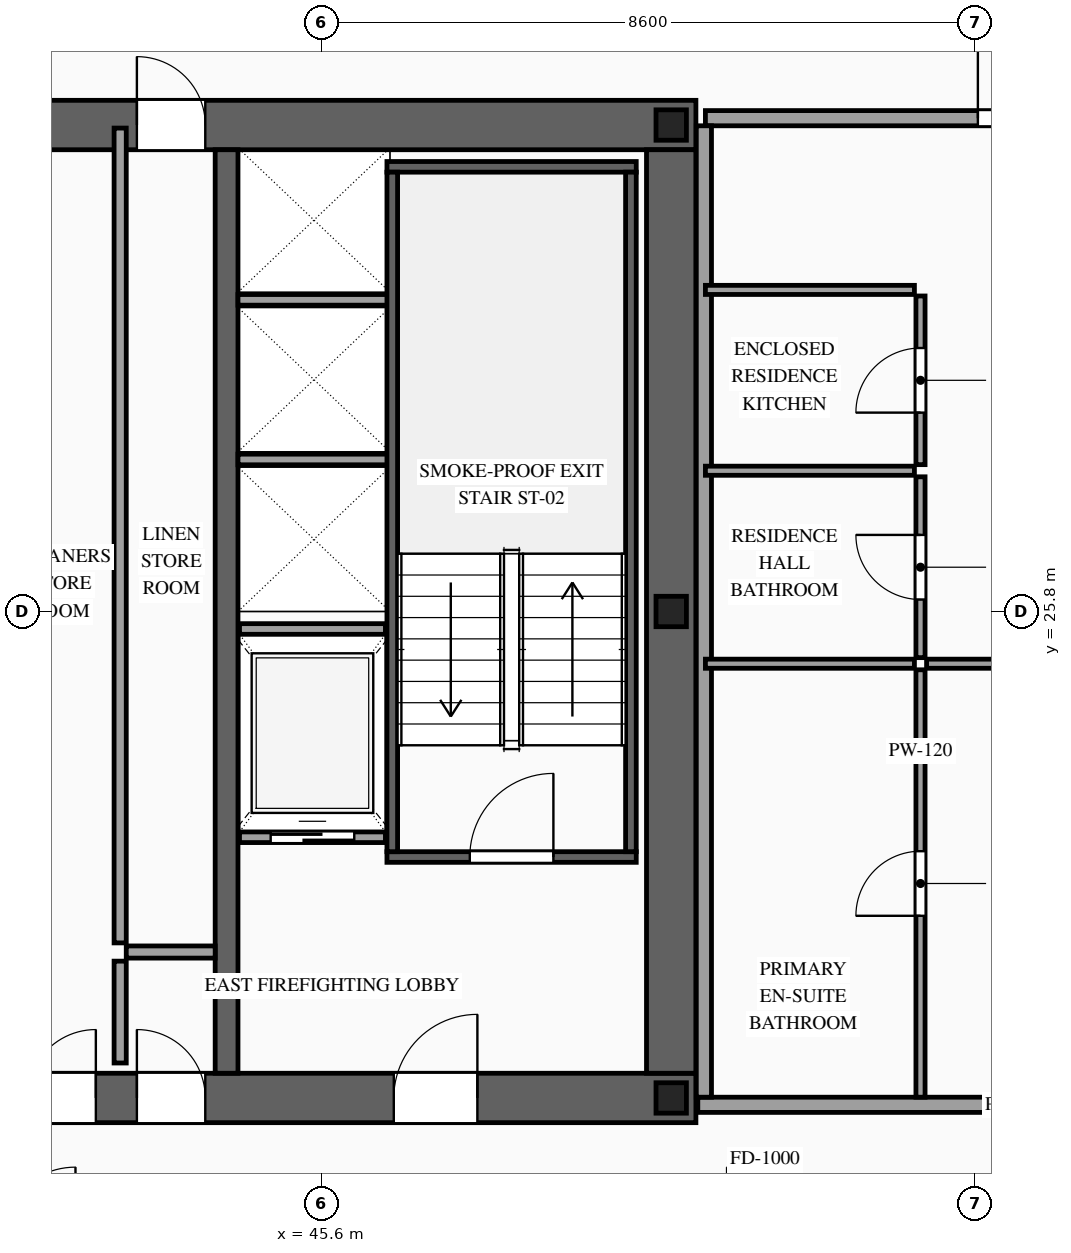
"""IFC4 building model, lengths in metres.
Left out: names, types, materials, properties, quantities, classifications, styles, units other than length and angle.
Written with IfcOpenShell. Run it as: python <this file> out.ifc"""

import sys

from ifc_helpers import new_model, si_unit, direction, frame, frame_2d, origin, origin_2d, place, context, subcontext, project, spatial, rectangle, i_section, extrude, source, transform, mapped, element, fill, save


model = new_model("IFC4")
c1 = context("Model", 3, precision=1e-05, world=origin(), true_north=direction((0.0, 1.0)))
c2 = subcontext(c1, "Body", "Model", "MODEL_VIEW")
j1 = project(units=[si_unit("LENGTHUNIT", "METRE"), si_unit("PLANEANGLEUNIT", "RADIAN")], contexts=[c1])
p1 = place(None, origin())
s1 = spatial("IfcSite", under=j1, at=p1, CompositionType="ELEMENT")
p2 = place(p1, origin())
s2 = spatial("IfcBuilding", under=s1, at=p2, CompositionType="ELEMENT")
p3 = place(p2, frame((0.0, 0.0, 188.0)))
s3 = spatial("IfcBuildingStorey", under=s2, at=p3, CompositionType="ELEMENT", Elevation=188.0)
p4 = place(p3, frame((23.475, 19.4, 0.0), z_axis=(0.0, 0.0, 1.0), x_axis=(1.0, 0.0, 0.0)))
e1 = element("IfcWall", 1, at=p4, inside=s3, PredefinedType="SHEAR", context=c2, shape_type="SweptSolid", body=[
    extrude(rectangle(XDim=27.05, YDim=0.65, at=frame_2d((13.525, 0.0))), origin(), (0.0, 0.0, 1.0), 3.5),
])
p5 = place(p4, frame((1.975, 0.0, 0.0)))
e2 = element("IfcOpeningElement", 2, at=p5, cuts=e1, PredefinedType="OPENING", context=c2, shape_type="SweptSolid", body=[
    extrude(rectangle(XDim=1.1, YDim=2.2, at=frame_2d((0.55, 1.1))), frame((0.0, 0.34, 0.0), z_axis=(0.0, -1.0, 0.0), x_axis=(1.0, 0.0, 0.0)), (0.0, 0.0, 1.0), 0.68),
])
p6 = place(p4, frame((9.875, 0.0, 0.0)))
e3 = element("IfcOpeningElement", 3, at=p6, cuts=e1, PredefinedType="OPENING", context=c2, shape_type="SweptSolid", body=[
    extrude(rectangle(XDim=1.1, YDim=2.2, at=frame_2d((0.55, 1.1))), frame((0.0, 0.34, 0.0), z_axis=(0.0, -1.0, 0.0), x_axis=(1.0, 0.0, 0.0)), (0.0, 0.0, 1.0), 0.68),
])
p7 = place(p4, frame((23.075, 0.0, 0.0)))
e4 = element("IfcOpeningElement", 4, at=p7, cuts=e1, PredefinedType="OPENING", context=c2, shape_type="SweptSolid", body=[
    extrude(rectangle(XDim=1.1, YDim=2.2, at=frame_2d((0.55, 1.1))), frame((0.0, 0.34, 0.0), z_axis=(0.0, -1.0, 0.0), x_axis=(1.0, 0.0, 0.0)), (0.0, 0.0, 1.0), 0.68),
])
p8 = place(p4, frame((19.695, 0.0, 0.0)))
e5 = element("IfcOpeningElement", 5, at=p8, cuts=e1, PredefinedType="OPENING", context=c2, shape_type="SweptSolid", body=[
    extrude(rectangle(XDim=0.9, YDim=2.15, at=frame_2d((0.45, 1.075))), frame((0.0, 0.34, 0.0), z_axis=(0.0, -1.0, 0.0), x_axis=(1.0, 0.0, 0.0)), (0.0, 0.0, 1.0), 0.68),
])
p9 = place(p4, frame((18.255, 0.0, 0.0)))
e6 = element("IfcOpeningElement", 6, at=p9, cuts=e1, PredefinedType="OPENING", context=c2, shape_type="SweptSolid", body=[
    extrude(rectangle(XDim=0.9, YDim=2.15, at=frame_2d((0.45, 1.075))), frame((0.0, 0.34, 0.0), z_axis=(0.0, -1.0, 0.0), x_axis=(1.0, 0.0, 0.0)), (0.0, 0.0, 1.0), 0.68),
])
p10 = place(p3, frame((23.475, 32.2, 0.0), z_axis=(0.0, 0.0, 1.0), x_axis=(1.0, 0.0, 0.0)))
e7 = element("IfcWall", 7, at=p10, inside=s3, PredefinedType="SHEAR", context=c2, shape_type="SweptSolid", body=[
    extrude(rectangle(XDim=27.05, YDim=0.65, at=frame_2d((13.525, 0.0))), origin(), (0.0, 0.0, 1.0), 3.5),
])
p11 = place(p10, frame((4.595, 0.0, 0.0)))
e8 = element("IfcOpeningElement", 8, at=p11, cuts=e7, PredefinedType="OPENING", context=c2, shape_type="SweptSolid", body=[
    extrude(rectangle(XDim=0.9, YDim=2.15, at=frame_2d((0.45, 1.075))), frame((0.0, 0.34, 0.0), z_axis=(0.0, -1.0, 0.0), x_axis=(1.0, 0.0, 0.0)), (0.0, 0.0, 1.0), 0.68),
])
p12 = place(p10, frame((9.875, 0.0, 0.0)))
e9 = element("IfcOpeningElement", 9, at=p12, cuts=e7, PredefinedType="OPENING", context=c2, shape_type="SweptSolid", body=[
    extrude(rectangle(XDim=1.1, YDim=2.2, at=frame_2d((0.55, 1.1))), frame((0.0, 0.34, 0.0), z_axis=(0.0, -1.0, 0.0), x_axis=(1.0, 0.0, 0.0)), (0.0, 0.0, 1.0), 0.68),
])
p13 = place(p10, frame((15.725, 0.0, 0.0)))
e10 = element("IfcOpeningElement", 10, at=p13, cuts=e7, PredefinedType="OPENING", context=c2, shape_type="SweptSolid", body=[
    extrude(rectangle(XDim=1.1, YDim=2.2, at=frame_2d((0.55, 1.1))), frame((0.0, 0.34, 0.0), z_axis=(0.0, -1.0, 0.0), x_axis=(1.0, 0.0, 0.0)), (0.0, 0.0, 1.0), 0.68),
])
p14 = place(p10, frame((19.695, 0.0, 0.0)))
e11 = element("IfcOpeningElement", 11, at=p14, cuts=e7, PredefinedType="OPENING", context=c2, shape_type="SweptSolid", body=[
    extrude(rectangle(XDim=0.9, YDim=2.15, at=frame_2d((0.45, 1.075))), frame((0.0, 0.34, 0.0), z_axis=(0.0, -1.0, 0.0), x_axis=(1.0, 0.0, 0.0)), (0.0, 0.0, 1.0), 0.68),
])
m1 = source(origin(), c2, "Body", "SweptSolid", [
    extrude(rectangle(XDim=12.15, YDim=0.65, at=frame_2d((6.075, 0.0))), origin(), (0.0, 0.0, 1.0), 3.5),
])
p15 = place(p3, frame((50.2, 19.725, 0.0), z_axis=(0.0, 0.0, 1.0), x_axis=(0.0, 1.0, 0.0)))
e12 = element("IfcWall", 12, at=p15, inside=s3, PredefinedType="SHEAR", context=c2, shape_type="MappedRepresentation", body=[
    mapped(m1, transform((0.0, 0.0, 0.0), scale=1.0)),
])
m2 = source(origin(), c2, "Body", "SweptSolid", [
    extrude(rectangle(XDim=12.15, YDim=0.3, at=frame_2d((6.075, 0.0))), origin(), (0.0, 0.0, 1.0), 3.5),
])
p16 = place(p3, frame((44.35, 19.725, 0.0), z_axis=(0.0, 0.0, 1.0), x_axis=(0.0, 1.0, 0.0)))
e13 = element("IfcWall", 13, at=p16, inside=s3, PredefinedType="SOLIDWALL", context=c2, shape_type="MappedRepresentation", body=[
    mapped(m2, transform((0.0, 0.0, 0.0), scale=1.0)),
])
m3 = source(origin(), c2, "Body", "SweptSolid", [
    extrude(i_section(OverallWidth=0.4, OverallDepth=0.4, WebThickness=0.013, FlangeThickness=0.021, at=origin_2d()), origin(), (0.0, 0.0, 1.0), 3.5),
])
for number, where, z_axis, x_axis in (
    (14, (50.2, 19.4, 0.0), (0.0, 0.0, 1.0), (1.0, 0.0, 0.0)),
    (15, (50.2, 25.8, 0.0), (0.0, 0.0, 1.0), (1.0, 0.0, 0.0)),
    (16, (50.2, 32.2, 0.0), (0.0, 0.0, 1.0), (1.0, 0.0, 0.0)),
):
    element("IfcColumn", number, at=place(p3, frame(where, z_axis=z_axis, x_axis=x_axis)), inside=s3, PredefinedType="COLUMN", context=c2, shape_type="MappedRepresentation", body=[
        mapped(m3, transform((0.0, 0.0, 0.0), scale=1.0)),
    ])
p17 = place(p3, frame((44.52, 22.83, 0.0), z_axis=(0.0, 0.0, 1.0), x_axis=(1.0, 0.0, 0.0)))
e17 = element("IfcWall", 17, at=p17, inside=s3, PredefinedType="SOLIDWALL", context=c2, shape_type="SweptSolid", body=[
    extrude(rectangle(XDim=1.92, YDim=0.14, at=frame_2d((0.96, 0.0))), origin(), (0.0, 0.0, 1.0), 3.28),
])
p18 = place(p17, frame((0.41, 0.0, 0.0)))
e18 = element("IfcOpeningElement", 18, at=p18, cuts=e17, PredefinedType="OPENING", context=c2, shape_type="SweptSolid", body=[
    extrude(rectangle(XDim=1.1, YDim=2.2, at=frame_2d((0.55, 1.1))), frame((0.0, 0.085, 0.0), z_axis=(0.0, -1.0, 0.0), x_axis=(1.0, 0.0, 0.0)), (0.0, 0.0, 1.0), 0.17),
])
m4 = source(origin(), c2, "Body", "SweptSolid", [
    extrude(rectangle(XDim=1.92, YDim=0.14, at=frame_2d((0.96, 0.0))), origin(), (0.0, 0.0, 1.0), 3.28),
])
p19 = place(p3, frame((44.52, 25.57, 0.0), z_axis=(0.0, 0.0, 1.0), x_axis=(1.0, 0.0, 0.0)))
e19 = element("IfcWall", 19, at=p19, inside=s3, PredefinedType="SOLIDWALL", context=c2, shape_type="MappedRepresentation", body=[
    mapped(m4, transform((0.0, 0.0, 0.0), scale=1.0)),
])
m5 = source(origin(), c2, "Body", "SweptSolid", [
    extrude(rectangle(XDim=2.0, YDim=0.14, at=frame_2d((1.0, 0.0))), origin(), (0.0, 0.0, 1.0), 3.28),
])
for number, where, z_axis, x_axis in (
    (20, (44.5, 27.8, 0.0), (0.0, 0.0, 1.0), (1.0, 0.0, 0.0)),
    (21, (44.5, 29.9, 0.0), (0.0, 0.0, 1.0), (1.0, 0.0, 0.0)),
):
    element("IfcWall", number, at=place(p3, frame(where, z_axis=z_axis, x_axis=x_axis)), inside=s3, PredefinedType="SOLIDWALL", context=c2, shape_type="MappedRepresentation", body=[
        mapped(m5, transform((0.0, 0.0, 0.0), scale=1.0)),
    ])
p20 = place(p3, frame((46.46, 22.57, 0.0), z_axis=(0.0, 0.0, 1.0), x_axis=(1.0, 0.0, 0.0)))
e22 = element("IfcWall", 22, at=p20, inside=s3, PredefinedType="SOLIDWALL", context=c2, shape_type="SweptSolid", body=[
    extrude(rectangle(XDim=3.28, YDim=0.14, at=frame_2d((1.64, 0.0))), origin(), (0.0, 0.0, 1.0), 3.28),
])
p21 = place(p20, frame((1.09, 0.0, 0.0)))
e23 = element("IfcOpeningElement", 23, at=p21, cuts=e22, PredefinedType="OPENING", context=c2, shape_type="SweptSolid", body=[
    extrude(rectangle(XDim=1.1, YDim=2.2, at=frame_2d((0.55, 1.1))), frame((0.0, 0.085, 0.0), z_axis=(0.0, -1.0, 0.0), x_axis=(1.0, 0.0, 0.0)), (0.0, 0.0, 1.0), 0.17),
])
m6 = source(origin(), c2, "Body", "SweptSolid", [
    extrude(rectangle(XDim=3.28, YDim=0.14, at=frame_2d((1.64, 0.0))), origin(), (0.0, 0.0, 1.0), 3.28),
])
p22 = place(p3, frame((46.46, 31.65, 0.0), z_axis=(0.0, 0.0, 1.0), x_axis=(1.0, 0.0, 0.0)))
e24 = element("IfcWall", 24, at=p22, inside=s3, PredefinedType="SOLIDWALL", context=c2, shape_type="MappedRepresentation", body=[
    mapped(m6, transform((0.0, 0.0, 0.0), scale=1.0)),
])
m7 = source(origin(), c2, "Body", "SweptSolid", [
    extrude(rectangle(XDim=8.94, YDim=0.14, at=frame_2d((4.47, 0.0))), origin(), (0.0, 0.0, 1.0), 3.28),
])
for number, where, z_axis, x_axis in (
    (25, (46.53, 22.64, 0.0), (0.0, 0.0, 1.0), (0.0, 1.0, 0.0)),
    (26, (49.67, 22.64, 0.0), (0.0, 0.0, 1.0), (0.0, 1.0, 0.0)),
):
    element("IfcWall", number, at=place(p3, frame(where, z_axis=z_axis, x_axis=x_axis)), inside=s3, PredefinedType="SOLIDWALL", context=c2, shape_type="MappedRepresentation", body=[
        mapped(m7, transform((0.0, 0.0, 0.0), scale=1.0)),
    ])
m8 = source(origin(), c2, "Body", "SweptSolid", [
    extrude(rectangle(XDim=1.34, YDim=0.16, at=frame_2d((0.67, 0.0))), origin(), (0.0, 0.0, 1.0), 3.28),
])
p23 = place(p3, frame((42.95, 19.86, 0.0), z_axis=(0.0, 0.0, 1.0), x_axis=(0.0, 1.0, 0.0)))
e27 = element("IfcWall", 27, at=p23, inside=s3, PredefinedType="PARTITIONING", context=c2, shape_type="MappedRepresentation", body=[
    mapped(m8, transform((0.0, 0.0, 0.0), scale=1.0)),
])
m9 = source(origin(), c2, "Body", "SweptSolid", [
    extrude(rectangle(XDim=1.17, YDim=0.16, at=frame_2d((0.585, 0.0))), origin(), (0.0, 0.0, 1.0), 3.28),
])
p24 = place(p3, frame((43.03, 21.32, 0.0), z_axis=(0.0, 0.0, 1.0), x_axis=(1.0, 0.0, 0.0)))
e28 = element("IfcWall", 28, at=p24, inside=s3, PredefinedType="PARTITIONING", context=c2, shape_type="MappedRepresentation", body=[
    mapped(m9, transform((0.0, 0.0, 0.0), scale=1.0)),
])
m10 = source(origin(), c2, "Body", "SweptSolid", [
    extrude(rectangle(XDim=10.72, YDim=0.16, at=frame_2d((5.36, 0.0))), origin(), (0.0, 0.0, 1.0), 3.28),
])
p25 = place(p3, frame((42.95, 21.44, 0.0), z_axis=(0.0, 0.0, 1.0), x_axis=(0.0, 1.0, 0.0)))
e29 = element("IfcWall", 29, at=p25, inside=s3, PredefinedType="PARTITIONING", context=c2, shape_type="MappedRepresentation", body=[
    mapped(m10, transform((0.0, 0.0, 0.0), scale=1.0)),
])
p26 = place(p3, frame((50.65, 32.29, 0.0), z_axis=(0.0, 0.0, 1.0), x_axis=(1.0, 0.0, 0.0)))
e30 = element("IfcWall", 30, at=p26, inside=s3, PredefinedType="PARTITIONING", context=c2, shape_type="SweptSolid", body=[
    extrude(rectangle(XDim=8.3, YDim=0.2, at=frame_2d((4.15, 0.0))), origin(), (0.0, 0.0, 1.0), 2.775),
])
p27 = place(p26, frame((3.585, 0.0, 0.0)))
e31 = element("IfcOpeningElement", 31, at=p27, cuts=e30, PredefinedType="OPENING", context=c2, shape_type="SweptSolid", body=[
    extrude(rectangle(XDim=1.0, YDim=2.2, at=frame_2d((0.5, 1.1))), frame((0.0, 0.115, 0.0), z_axis=(0.0, -1.0, 0.0), x_axis=(1.0, 0.0, 0.0)), (0.0, 0.0, 1.0), 0.23),
])
m11 = source(origin(), c2, "Body", "SweptSolid", [
    extrude(rectangle(XDim=8.4, YDim=0.2, at=frame_2d((4.2, 0.0))), origin(), (0.0, 0.0, 1.0), 2.775),
])
p28 = place(p3, frame((50.55, 19.31, 0.0), z_axis=(0.0, 0.0, 1.0), x_axis=(1.0, 0.0, 0.0)))
e32 = element("IfcWall", 32, at=p28, inside=s3, PredefinedType="PARTITIONING", context=c2, shape_type="MappedRepresentation", body=[
    mapped(m11, transform((0.0, 0.0, 0.0), scale=1.0)),
])
m12 = source(origin(), c2, "Body", "SweptSolid", [
    extrude(rectangle(XDim=12.78, YDim=0.2, at=frame_2d((6.39, 0.0))), origin(), (0.0, 0.0, 1.0), 3.28),
])
p29 = place(p3, frame((50.63, 19.41, 0.0), z_axis=(0.0, 0.0, 1.0), x_axis=(0.0, 1.0, 0.0)))
e33 = element("IfcWall", 33, at=p29, inside=s3, PredefinedType="PARTITIONING", context=c2, shape_type="MappedRepresentation", body=[
    mapped(m12, transform((0.0, 0.0, 0.0), scale=1.0)),
])
m13 = source(origin(), c2, "Body", "SweptSolid", [
    extrude(rectangle(XDim=2.75, YDim=0.12, at=frame_2d((1.375, 0.0))), origin(), (0.0, 0.0, 1.0), 3.28),
])
for number, where, z_axis, x_axis in (
    (34, (50.65, 25.113, 0.0), (0.0, 0.0, 1.0), (1.0, 0.0, 0.0)),
    (35, (50.65, 27.652, 0.0), (0.0, 0.0, 1.0), (1.0, 0.0, 0.0)),
):
    element("IfcWall", number, at=place(p3, frame(where, z_axis=z_axis, x_axis=x_axis)), inside=s3, PredefinedType="PARTITIONING", context=c2, shape_type="MappedRepresentation", body=[
        mapped(m13, transform((0.0, 0.0, 0.0), scale=1.0)),
    ])
p30 = place(p3, frame((53.48, 25.193, 0.0), z_axis=(0.0, 0.0, 1.0), x_axis=(0.0, 1.0, 0.0)))
e36 = element("IfcWall", 36, at=p30, inside=s3, PredefinedType="PARTITIONING", context=c2, shape_type="SweptSolid", body=[
    extrude(rectangle(XDim=2.379, YDim=0.12, at=frame_2d((1.189, 0.0))), origin(), (0.0, 0.0, 1.0), 3.28),
])
p31 = place(p30, frame((0.764, 0.0, 0.0)))
e37 = element("IfcOpeningElement", 37, at=p31, cuts=e36, PredefinedType="OPENING", context=c2, shape_type="SweptSolid", body=[
    extrude(rectangle(XDim=0.85, YDim=2.1, at=frame_2d((0.425, 1.05))), frame((0.0, 0.075, 0.0), z_axis=(0.0, -1.0, 0.0), x_axis=(1.0, 0.0, 0.0)), (0.0, 0.0, 1.0), 0.15),
])
p32 = place(p3, frame((50.65, 30.031, 0.0), z_axis=(0.0, 0.0, 1.0), x_axis=(1.0, 0.0, 0.0)))
e38 = element("IfcWall", 38, at=p32, inside=s3, PredefinedType="PARTITIONING", context=c2, shape_type="MappedRepresentation", body=[
    mapped(m13, transform((0.0, 0.0, 0.0), scale=1.0)),
])
p33 = place(p3, frame((53.48, 27.732, 0.0), z_axis=(0.0, 0.0, 1.0), x_axis=(0.0, 1.0, 0.0)))
e39 = element("IfcWall", 39, at=p33, inside=s3, PredefinedType="PARTITIONING", context=c2, shape_type="SweptSolid", body=[
    extrude(rectangle(XDim=2.219, YDim=0.12, at=frame_2d((1.109, 0.0))), origin(), (0.0, 0.0, 1.0), 3.28),
])
p34 = place(p33, frame((0.685, 0.0, 0.0)))
e40 = element("IfcOpeningElement", 40, at=p34, cuts=e39, PredefinedType="OPENING", context=c2, shape_type="SweptSolid", body=[
    extrude(rectangle(XDim=0.85, YDim=2.1, at=frame_2d((0.425, 1.05))), frame((0.0, 0.075, 0.0), z_axis=(0.0, -1.0, 0.0), x_axis=(1.0, 0.0, 0.0)), (0.0, 0.0, 1.0), 0.15),
])
p35 = place(p3, frame((53.56, 25.113, 0.0), z_axis=(0.0, 0.0, 1.0), x_axis=(1.0, 0.0, 0.0)))
e41 = element("IfcWall", 41, at=p35, inside=s3, PredefinedType="PARTITIONING", context=c2, shape_type="SweptSolid", body=[
    extrude(rectangle(XDim=5.39, YDim=0.12, at=frame_2d((2.695, 0.0))), origin(), (0.0, 0.0, 1.0), 3.28),
])
p36 = place(p35, frame((2.245, 0.0, 0.0)))
e42 = element("IfcOpeningElement", 42, at=p36, cuts=e41, PredefinedType="OPENING", context=c2, shape_type="SweptSolid", body=[
    extrude(rectangle(XDim=0.9, YDim=2.15, at=frame_2d((0.45, 1.075))), frame((0.0, 0.075, 0.0), z_axis=(0.0, -1.0, 0.0), x_axis=(1.0, 0.0, 0.0)), (0.0, 0.0, 1.0), 0.15),
])
p37 = place(p3, frame((53.48, 19.41, 0.0), z_axis=(0.0, 0.0, 1.0), x_axis=(0.0, 1.0, 0.0)))
e43 = element("IfcWall", 43, at=p37, inside=s3, PredefinedType="PARTITIONING", context=c2, shape_type="SweptSolid", body=[
    extrude(rectangle(XDim=5.623, YDim=0.12, at=frame_2d((2.812, 0.0))), origin(), (0.0, 0.0, 1.0), 3.28),
])
p38 = place(p37, frame((2.386, 0.0, 0.0)))
e44 = element("IfcOpeningElement", 44, at=p38, cuts=e43, PredefinedType="OPENING", context=c2, shape_type="SweptSolid", body=[
    extrude(rectangle(XDim=0.85, YDim=2.1, at=frame_2d((0.425, 1.05))), frame((0.0, 0.075, 0.0), z_axis=(0.0, -1.0, 0.0), x_axis=(1.0, 0.0, 0.0)), (0.0, 0.0, 1.0), 0.15),
])
m14 = source(origin(), c2, "Body", "SweptSolid", [
    extrude(rectangle(XDim=1.1, YDim=2.2, at=frame_2d((0.55, 1.1))), frame((0.0, 0.025, 0.0), z_axis=(0.0, -1.0, 0.0), x_axis=(1.0, 0.0, 0.0)), (0.0, 0.0, 1.0), 0.05),
])
p39 = place(p18, origin())
e45 = element("IfcDoor", 45, at=p39, inside=s3, OperationType="SLIDING_TO_RIGHT", PredefinedType="DOOR", context=c2, shape_type="MappedRepresentation", body=[
    mapped(m14, transform((0.0, 0.0, 0.0), scale=1.0)),
])
fill(e18, e45)
m15 = source(origin(), c2, "Body", "SweptSolid", [
    extrude(rectangle(XDim=1.1, YDim=2.2, at=frame_2d((0.55, 1.1))), frame((0.0, 0.025, 0.0), z_axis=(0.0, -1.0, 0.0), x_axis=(1.0, 0.0, 0.0)), (0.0, 0.0, 1.0), 0.05),
])
p40 = place(p21, origin())
e46 = element("IfcDoor", 46, at=p40, inside=s3, OperationType="SINGLE_SWING_RIGHT", PredefinedType="DOOR", context=c2, shape_type="MappedRepresentation", body=[
    mapped(m15, transform((0.0, 0.0, 0.0), scale=1.0)),
])
fill(e23, e46)
p41 = place(p7, origin())
e47 = element("IfcDoor", 47, at=p41, inside=s3, OperationType="SINGLE_SWING_RIGHT", PredefinedType="DOOR", context=c2, shape_type="MappedRepresentation", body=[
    mapped(m15, transform((0.0, 0.0, 0.0), scale=1.0)),
])
fill(e4, e47)
m16 = source(origin(), c2, "Body", "SweptSolid", [
    extrude(rectangle(XDim=0.9, YDim=2.15, at=frame_2d((0.45, 1.075))), frame((0.0, 0.025, 0.0), z_axis=(0.0, -1.0, 0.0), x_axis=(1.0, 0.0, 0.0)), (0.0, 0.0, 1.0), 0.05),
])
p42 = place(p8, origin())
e48 = element("IfcDoor", 48, at=p42, inside=s3, OperationType="SINGLE_SWING_LEFT", PredefinedType="DOOR", context=c2, shape_type="MappedRepresentation", body=[
    mapped(m16, transform((0.0, 0.0, 0.0), scale=1.0)),
])
fill(e5, e48)
p43 = place(p9, origin())
e49 = element("IfcDoor", 49, at=p43, inside=s3, OperationType="SINGLE_SWING_RIGHT", PredefinedType="DOOR", context=c2, shape_type="MappedRepresentation", body=[
    mapped(m16, transform((0.0, 0.0, 0.0), scale=1.0)),
])
fill(e6, e49)
p44 = place(p14, origin())
e50 = element("IfcDoor", 50, at=p44, inside=s3, OperationType="SINGLE_SWING_LEFT", PredefinedType="DOOR", context=c2, shape_type="MappedRepresentation", body=[
    mapped(m16, transform((0.0, 0.0, 0.0), scale=1.0)),
])
fill(e11, e50)
m17 = source(origin(), c2, "Body", "SweptSolid", [
    extrude(rectangle(XDim=1.0, YDim=2.2, at=frame_2d((0.5, 1.1))), frame((0.0, 0.025, 0.0), z_axis=(0.0, -1.0, 0.0), x_axis=(1.0, 0.0, 0.0)), (0.0, 0.0, 1.0), 0.05),
])
p45 = place(p27, origin())
e51 = element("IfcDoor", 51, at=p45, inside=s3, OperationType="SINGLE_SWING_LEFT", PredefinedType="DOOR", context=c2, shape_type="MappedRepresentation", body=[
    mapped(m17, transform((0.0, 0.0, 0.0), scale=1.0)),
])
fill(e31, e51)
m18 = source(origin(), c2, "Body", "SweptSolid", [
    extrude(rectangle(XDim=0.85, YDim=2.1, at=frame_2d((0.425, 1.05))), frame((0.0, 0.025, 0.0), z_axis=(0.0, -1.0, 0.0), x_axis=(1.0, 0.0, 0.0)), (0.0, 0.0, 1.0), 0.05),
])
p46 = place(p31, origin())
e52 = element("IfcDoor", 52, at=p46, inside=s3, OperationType="SINGLE_SWING_RIGHT", PredefinedType="DOOR", context=c2, shape_type="MappedRepresentation", body=[
    mapped(m18, transform((0.0, 0.0, 0.0), scale=1.0)),
])
fill(e37, e52)
p47 = place(p34, origin())
e53 = element("IfcDoor", 53, at=p47, inside=s3, OperationType="SINGLE_SWING_LEFT", PredefinedType="DOOR", context=c2, shape_type="MappedRepresentation", body=[
    mapped(m18, transform((0.0, 0.0, 0.0), scale=1.0)),
])
fill(e40, e53)
p48 = place(p38, origin())
e54 = element("IfcDoor", 54, at=p48, inside=s3, OperationType="SINGLE_SWING_LEFT", PredefinedType="DOOR", context=c2, shape_type="MappedRepresentation", body=[
    mapped(m18, transform((0.0, 0.0, 0.0), scale=1.0)),
])
fill(e44, e54)
save(model, sys.argv[1])
